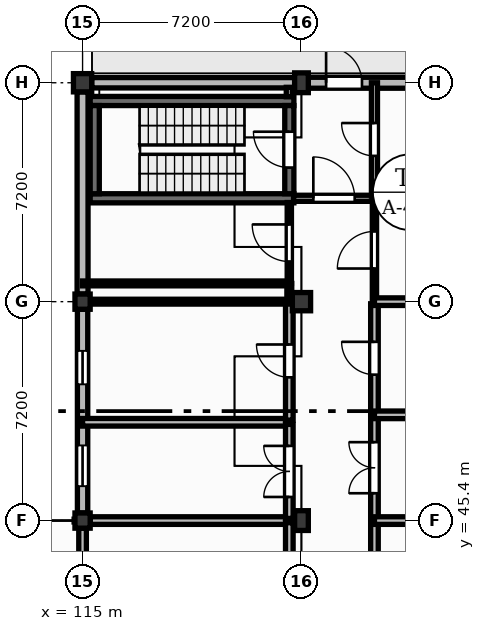
"""IFC4 building model, lengths in metres.
Left out: names, types, materials, properties, quantities, classifications, styles, units other than length and angle.
Written with IfcOpenShell. Run it as: python <this file> out.ifc"""

import sys

from ifc_helpers import new_model, si_unit, direction, frame, frame_2d, origin, origin_2d, place, context, subcontext, project, spatial, rectangle, extrude, element, fill, save


model = new_model("IFC4")
c1 = context("Model", 3, precision=1e-05, world=origin(), true_north=direction((0.0, 1.0)))
c2 = subcontext(c1, "Body", "Model", "MODEL_VIEW")
j1 = project(units=[si_unit("LENGTHUNIT", "METRE"), si_unit("PLANEANGLEUNIT", "RADIAN")], contexts=[c1])
p1 = place(None, origin())
s1 = spatial("IfcSite", under=j1, at=p1, CompositionType="ELEMENT")
p2 = place(p1, origin())
s2 = spatial("IfcBuilding", under=s1, at=p2, CompositionType="ELEMENT")
p3 = place(p2, origin())
s3 = spatial("IfcBuildingStorey", under=s2, at=p3, CompositionType="ELEMENT", Elevation=0.0)
for number, where, z_axis, x_axis in (
    (1, (115.0, 45.4, 0.0), (0.0, 0.0, 1.0), (1.0, 0.0, 0.0)),
    (2, (115.0, 52.6, 0.0), (0.0, 0.0, 1.0), (1.0, 0.0, 0.0)),
):
    element("IfcColumn", number, at=place(p3, frame(where, z_axis=z_axis, x_axis=x_axis)), inside=s3, PredefinedType="COLUMN", context=c2, shape_type="SweptSolid", body=[
        extrude(rectangle(XDim=0.5, YDim=0.5, at=origin_2d()), origin(), (0.0, 0.0, 1.0), 4.2),
    ])
p4 = place(p3, frame((115.0, 59.8, 0.0), z_axis=(0.0, 0.0, 1.0), x_axis=(1.0, 0.0, 0.0)))
e3 = element("IfcColumn", 3, at=p4, inside=s3, PredefinedType="COLUMN", context=c2, shape_type="SweptSolid", body=[
    extrude(rectangle(XDim=0.6, YDim=0.6, at=origin_2d()), origin(), (0.0, 0.0, 1.0), 4.2),
])
p5 = place(p3, frame((122.2, 45.4, 0.0), z_axis=(0.0, 0.0, 1.0), x_axis=(1.0, 0.0, 0.0)))
e4 = element("IfcColumn", 4, at=p5, inside=s3, PredefinedType="COLUMN", context=c2, shape_type="SweptSolid", body=[
    extrude(rectangle(XDim=0.45, YDim=0.65, at=origin_2d()), origin(), (0.0, 0.0, 1.0), 4.2),
])
p6 = place(p3, frame((122.2, 52.6, 0.0), z_axis=(0.0, 0.0, 1.0), x_axis=(1.0, 0.0, 0.0)))
e5 = element("IfcColumn", 5, at=p6, inside=s3, PredefinedType="COLUMN", context=c2, shape_type="SweptSolid", body=[
    extrude(rectangle(XDim=0.6, YDim=0.6, at=origin_2d()), origin(), (0.0, 0.0, 1.0), 4.2),
])
p7 = place(p3, frame((122.2, 59.8, 0.0), z_axis=(0.0, 0.0, 1.0), x_axis=(1.0, 0.0, 0.0)))
e6 = element("IfcColumn", 6, at=p7, inside=s3, PredefinedType="COLUMN", context=c2, shape_type="SweptSolid", body=[
    extrude(rectangle(XDim=0.45, YDim=0.65, at=origin_2d()), origin(), (0.0, 0.0, 1.0), 4.2),
])
p8 = place(p3, frame((115.0, 45.65, 0.0), z_axis=(0.0, 0.0, 1.0), x_axis=(0.0, 1.0, 0.0)))
e7 = element("IfcWall", 7, at=p8, inside=s3, PredefinedType="SOLIDWALL", context=c2, shape_type="SweptSolid", body=[
    extrude(rectangle(XDim=6.7, YDim=0.34, at=frame_2d((3.35, 0.0))), origin(), (0.0, 0.0, 1.0), 3.68),
])
p9 = place(p8, frame((0.881, 0.0, 1.0)))
e8 = element("IfcOpeningElement", 8, at=p9, cuts=e7, PredefinedType="OPENING", context=c2, shape_type="SweptSolid", body=[
    extrude(rectangle(XDim=1.34, YDim=1.95, at=frame_2d((0.67, 0.975))), frame((0.0, 0.18, 0.0), z_axis=(0.0, -1.0, 0.0), x_axis=(1.0, 0.0, 0.0)), (0.0, 0.0, 1.0), 0.36),
])
p10 = place(p8, frame((4.231, 0.0, 1.0)))
e9 = element("IfcOpeningElement", 9, at=p10, cuts=e7, PredefinedType="OPENING", context=c2, shape_type="SweptSolid", body=[
    extrude(rectangle(XDim=1.1, YDim=2.2, at=frame_2d((0.55, 1.1))), frame((0.0, 0.18, 0.0), z_axis=(0.0, -1.0, 0.0), x_axis=(1.0, 0.0, 0.0)), (0.0, 0.0, 1.0), 0.36),
])
p11 = place(p3, frame((115.3, 59.8, 0.0), z_axis=(0.0, 0.0, 1.0), x_axis=(1.0, 0.0, 0.0)))
e10 = element("IfcWall", 10, at=p11, inside=s3, PredefinedType="SOLIDWALL", context=c2, shape_type="SweptSolid", body=[
    extrude(rectangle(XDim=6.675, YDim=0.34, at=frame_2d((3.337, 0.0))), origin(), (0.0, 0.0, 1.0), 3.68),
])
p12 = place(p3, frame((115.0, 52.85, 0.0), z_axis=(0.0, 0.0, 1.0), x_axis=(0.0, 1.0, 0.0)))
e11 = element("IfcWall", 11, at=p12, inside=s3, PredefinedType="SOLIDWALL", context=c2, shape_type="SweptSolid", body=[
    extrude(rectangle(XDim=6.65, YDim=0.36, at=frame_2d((3.325, 0.0))), origin(), (0.0, 0.0, 1.0), 3.68),
])
p13 = place(p3, frame((122.425, 59.8, 0.0), z_axis=(0.0, 0.0, 1.0), x_axis=(1.0, 0.0, 0.0)))
e12 = element("IfcWall", 12, at=p13, inside=s3, PredefinedType="SOLIDWALL", context=c2, shape_type="SweptSolid", body=[
    extrude(rectangle(XDim=5.925, YDim=0.36, at=frame_2d((2.962, 0.0))), origin(), (0.0, 0.0, 1.0), 3.68),
])
p14 = place(p13, frame((0.585, 0.0, 0.0)))
e13 = element("IfcOpeningElement", 13, at=p14, cuts=e12, PredefinedType="OPENING", context=c2, shape_type="SweptSolid", body=[
    extrude(rectangle(XDim=1.18, YDim=2.2, at=frame_2d((0.59, 1.1))), frame((0.0, 0.19, 0.0), z_axis=(0.0, -1.0, 0.0), x_axis=(1.0, 0.0, 0.0)), (0.0, 0.0, 1.0), 0.38),
])
p15 = place(p13, frame((3.315, 0.0, 1.0)))
e14 = element("IfcOpeningElement", 14, at=p15, cuts=e12, PredefinedType="OPENING", context=c2, shape_type="SweptSolid", body=[
    extrude(rectangle(XDim=1.35, YDim=2.2, at=frame_2d((0.675, 1.1))), frame((0.0, 0.19, 0.0), z_axis=(0.0, -1.0, 0.0), x_axis=(1.0, 0.0, 0.0)), (0.0, 0.0, 1.0), 0.38),
])
for number, where, z_axis, x_axis in (
    (15, (115.25, 56.0, 0.0), (0.0, 0.0, 1.0), (1.0, 0.0, 0.0)),
    (16, (115.25, 59.2, 0.0), (0.0, 0.0, 1.0), (1.0, 0.0, 0.0)),
):
    element("IfcWall", number, at=place(p3, frame(where, z_axis=z_axis, x_axis=x_axis)), inside=s3, PredefinedType="SHEAR", context=c2, shape_type="SweptSolid", body=[
        extrude(rectangle(XDim=6.7, YDim=0.3, at=frame_2d((3.35, 0.0))), origin(), (0.0, 0.0, 1.0), 4.25),
    ])
p16 = place(p3, frame((115.4, 56.15, 0.0), z_axis=(0.0, 0.0, 1.0), x_axis=(0.0, 1.0, 0.0)))
e17 = element("IfcWall", 17, at=p16, inside=s3, PredefinedType="SHEAR", context=c2, shape_type="SweptSolid", body=[
    extrude(rectangle(XDim=2.9, YDim=0.3, at=frame_2d((1.45, 0.0))), origin(), (0.0, 0.0, 1.0), 4.25),
])
p17 = place(p3, frame((121.8, 56.15, 0.0), z_axis=(0.0, 0.0, 1.0), x_axis=(0.0, 1.0, 0.0)))
e18 = element("IfcWall", 18, at=p17, inside=s3, PredefinedType="SHEAR", context=c2, shape_type="SweptSolid", body=[
    extrude(rectangle(XDim=2.9, YDim=0.3, at=frame_2d((1.45, 0.0))), origin(), (0.0, 0.0, 1.0), 4.25),
])
p18 = place(p17, frame((0.86, 0.0, 0.0)))
e19 = element("IfcOpeningElement", 19, at=p18, cuts=e18, PredefinedType="OPENING", context=c2, shape_type="SweptSolid", body=[
    extrude(rectangle(XDim=1.18, YDim=2.15, at=frame_2d((0.59, 1.075))), frame((0.0, 0.16, 0.0), z_axis=(0.0, -1.0, 0.0), x_axis=(1.0, 0.0, 0.0)), (0.0, 0.0, 1.0), 0.32),
])
p19 = place(p3, frame((115.0, 40.663, 0.0), z_axis=(0.0, 0.0, 1.0), x_axis=(0.0, 1.0, 0.0)))
e20 = element("IfcWall", 20, at=p19, inside=s3, PredefinedType="SOLIDWALL", context=c2, shape_type="SweptSolid", body=[
    extrude(rectangle(XDim=4.487, YDim=0.25, at=frame_2d((2.243, 0.0))), origin(), (0.0, 0.0, 1.0), 3.4),
])
p20 = place(p3, frame((115.25, 45.4, 0.0), z_axis=(0.0, 0.0, 1.0), x_axis=(1.0, 0.0, 0.0)))
e21 = element("IfcWall", 21, at=p20, inside=s3, PredefinedType="SOLIDWALL", context=c2, shape_type="SweptSolid", body=[
    extrude(rectangle(XDim=6.55, YDim=0.25, at=frame_2d((3.275, 0.0))), origin(), (0.0, 0.0, 1.0), 3.25),
])
p21 = place(p3, frame((115.0, 48.633, 0.0), z_axis=(0.0, 0.0, 1.0), x_axis=(1.0, 0.0, 0.0)))
e22 = element("IfcWall", 22, at=p21, inside=s3, PredefinedType="SOLIDWALL", context=c2, shape_type="SweptSolid", body=[
    extrude(rectangle(XDim=6.8, YDim=0.25, at=frame_2d((3.4, 0.0))), origin(), (0.0, 0.0, 1.0), 4.18),
])
p22 = place(p3, frame((121.8, 40.663, 0.0), z_axis=(0.0, 0.0, 1.0), x_axis=(0.0, 1.0, 0.0)))
e23 = element("IfcWall", 23, at=p22, inside=s3, PredefinedType="SOLIDWALL", context=c2, shape_type="SweptSolid", body=[
    extrude(rectangle(XDim=4.667, YDim=0.25, at=frame_2d((2.333, 0.0))), origin(), (0.0, 0.0, 1.0), 4.18),
])
p23 = place(p22, frame((1.793, 0.0, 0.0)))
e24 = element("IfcOpeningElement", 24, at=p23, cuts=e23, PredefinedType="OPENING", context=c2, shape_type="SweptSolid", body=[
    extrude(rectangle(XDim=1.08, YDim=2.15, at=frame_2d((0.54, 1.075))), frame((0.0, 0.135, 0.0), z_axis=(0.0, -1.0, 0.0), x_axis=(1.0, 0.0, 0.0)), (0.0, 0.0, 1.0), 0.27),
])
p24 = place(p3, frame((121.8, 45.47, 0.0), z_axis=(0.0, 0.0, 1.0), x_axis=(0.0, 1.0, 0.0)))
e25 = element("IfcWall", 25, at=p24, inside=s3, PredefinedType="SOLIDWALL", context=c2, shape_type="SweptSolid", body=[
    extrude(rectangle(XDim=3.093, YDim=0.25, at=frame_2d((1.546, 0.0))), origin(), (0.0, 0.0, 1.0), 4.18),
])
p25 = place(p24, frame((0.707, 0.0, 0.0)))
e26 = element("IfcOpeningElement", 26, at=p25, cuts=e25, PredefinedType="OPENING", context=c2, shape_type="SweptSolid", body=[
    extrude(rectangle(XDim=1.68, YDim=2.3, at=frame_2d((0.84, 1.15))), frame((0.0, 0.135, 0.0), z_axis=(0.0, -1.0, 0.0), x_axis=(1.0, 0.0, 0.0)), (0.0, 0.0, 1.0), 0.27),
])
p26 = place(p3, frame((121.8, 48.703, 0.0), z_axis=(0.0, 0.0, 1.0), x_axis=(0.0, 1.0, 0.0)))
e27 = element("IfcWall", 27, at=p26, inside=s3, PredefinedType="SOLIDWALL", context=c2, shape_type="SweptSolid", body=[
    extrude(rectangle(XDim=3.897, YDim=0.25, at=frame_2d((1.949, 0.0))), origin(), (0.0, 0.0, 1.0), 4.18),
])
p27 = place(p26, frame((1.408, 0.0, 0.0)))
e28 = element("IfcOpeningElement", 28, at=p27, cuts=e27, PredefinedType="OPENING", context=c2, shape_type="SweptSolid", body=[
    extrude(rectangle(XDim=1.08, YDim=2.15, at=frame_2d((0.54, 1.075))), frame((0.0, 0.135, 0.0), z_axis=(0.0, -1.0, 0.0), x_axis=(1.0, 0.0, 0.0)), (0.0, 0.0, 1.0), 0.27),
])
p28 = place(p3, frame((121.8, 53.2, 0.0), z_axis=(0.0, 0.0, 1.0), x_axis=(0.0, 1.0, 0.0)))
e29 = element("IfcWall", 29, at=p28, inside=s3, PredefinedType="PARTITIONING", context=c2, shape_type="SweptSolid", body=[
    extrude(rectangle(XDim=2.66, YDim=0.14, at=frame_2d((1.33, 0.0))), origin(), (0.0, 0.0, 1.0), 4.18),
])
p29 = place(p28, frame((0.72, 0.0, 0.0)))
e30 = element("IfcOpeningElement", 30, at=p29, cuts=e29, PredefinedType="OPENING", context=c2, shape_type="SweptSolid", body=[
    extrude(rectangle(XDim=1.22, YDim=2.1, at=frame_2d((0.61, 1.05))), frame((0.0, 0.08, 0.0), z_axis=(0.0, -1.0, 0.0), x_axis=(1.0, 0.0, 0.0)), (0.0, 0.0, 1.0), 0.16),
])
p30 = place(p3, frame((121.94, 56.0, 0.0), z_axis=(0.0, 0.0, 1.0), x_axis=(1.0, 0.0, 0.0)))
e31 = element("IfcWall", 31, at=p30, inside=s3, PredefinedType="PARTITIONING", context=c2, shape_type="SweptSolid", body=[
    extrude(rectangle(XDim=2.66, YDim=0.2, at=frame_2d((1.33, 0.0))), origin(), (0.0, 0.0, 1.0), 4.18),
])
p31 = place(p30, frame((0.65, 0.0, 0.0)))
e32 = element("IfcOpeningElement", 32, at=p31, cuts=e31, PredefinedType="OPENING", context=c2, shape_type="SweptSolid", body=[
    extrude(rectangle(XDim=1.36, YDim=2.2, at=frame_2d((0.68, 1.1))), frame((0.0, 0.11, 0.0), z_axis=(0.0, -1.0, 0.0), x_axis=(1.0, 0.0, 0.0)), (0.0, 0.0, 1.0), 0.22),
])
p32 = place(p3, frame((124.6, 41.97, 0.0), z_axis=(0.0, 0.0, 1.0), x_axis=(0.0, 1.0, 0.0)))
e33 = element("IfcWall", 33, at=p32, inside=s3, PredefinedType="SOLIDWALL", context=c2, shape_type="SweptSolid", body=[
    extrude(rectangle(XDim=3.36, YDim=0.25, at=frame_2d((1.68, 0.0))), origin(), (0.0, 0.0, 1.0), 4.18),
])
p33 = place(p32, frame((1.14, 0.0, 0.0)))
e34 = element("IfcOpeningElement", 34, at=p33, cuts=e33, PredefinedType="OPENING", context=c2, shape_type="SweptSolid", body=[
    extrude(rectangle(XDim=1.08, YDim=2.15, at=frame_2d((0.54, 1.075))), frame((0.0, 0.135, 0.0), z_axis=(0.0, -1.0, 0.0), x_axis=(1.0, 0.0, 0.0)), (0.0, 0.0, 1.0), 0.27),
])
p34 = place(p3, frame((124.6, 45.47, 0.0), z_axis=(0.0, 0.0, 1.0), x_axis=(0.0, 1.0, 0.0)))
e35 = element("IfcWall", 35, at=p34, inside=s3, PredefinedType="SOLIDWALL", context=c2, shape_type="SweptSolid", body=[
    extrude(rectangle(XDim=3.338, YDim=0.25, at=frame_2d((1.669, 0.0))), origin(), (0.0, 0.0, 1.0), 4.18),
])
p35 = place(p34, frame((0.829, 0.0, 0.0)))
e36 = element("IfcOpeningElement", 36, at=p35, cuts=e35, PredefinedType="OPENING", context=c2, shape_type="SweptSolid", body=[
    extrude(rectangle(XDim=1.68, YDim=2.3, at=frame_2d((0.84, 1.15))), frame((0.0, 0.135, 0.0), z_axis=(0.0, -1.0, 0.0), x_axis=(1.0, 0.0, 0.0)), (0.0, 0.0, 1.0), 0.27),
])
p36 = place(p3, frame((124.6, 45.4, 0.0), z_axis=(0.0, 0.0, 1.0), x_axis=(1.0, 0.0, 0.0)))
e37 = element("IfcWall", 37, at=p36, inside=s3, PredefinedType="SOLIDWALL", context=c2, shape_type="SweptSolid", body=[
    extrude(rectangle(XDim=3.7, YDim=0.25, at=frame_2d((1.85, 0.0))), origin(), (0.0, 0.0, 1.0), 3.25),
])
p37 = place(p3, frame((124.6, 48.948, 0.0), z_axis=(0.0, 0.0, 1.0), x_axis=(0.0, 1.0, 0.0)))
e38 = element("IfcWall", 38, at=p37, inside=s3, PredefinedType="SOLIDWALL", context=c2, shape_type="SweptSolid", body=[
    extrude(rectangle(XDim=3.582, YDim=0.25, at=frame_2d((1.791, 0.0))), origin(), (0.0, 0.0, 1.0), 4.18),
])
p38 = place(p37, frame((1.251, 0.0, 0.0)))
e39 = element("IfcOpeningElement", 39, at=p38, cuts=e38, PredefinedType="OPENING", context=c2, shape_type="SweptSolid", body=[
    extrude(rectangle(XDim=1.08, YDim=2.15, at=frame_2d((0.54, 1.075))), frame((0.0, 0.135, 0.0), z_axis=(0.0, -1.0, 0.0), x_axis=(1.0, 0.0, 0.0)), (0.0, 0.0, 1.0), 0.27),
])
p39 = place(p3, frame((124.6, 48.878, 0.0), z_axis=(0.0, 0.0, 1.0), x_axis=(1.0, 0.0, 0.0)))
e40 = element("IfcWall", 40, at=p39, inside=s3, PredefinedType="SOLIDWALL", context=c2, shape_type="SweptSolid", body=[
    extrude(rectangle(XDim=4.795, YDim=0.25, at=frame_2d((2.397, 0.0))), origin(), (0.0, 0.0, 1.0), 4.18),
])
p40 = place(p3, frame((124.6, 52.67, 0.0), z_axis=(0.0, 0.0, 1.0), x_axis=(0.0, 1.0, 0.0)))
e41 = element("IfcWall", 41, at=p40, inside=s3, PredefinedType="PARTITIONING", context=c2, shape_type="SweptSolid", body=[
    extrude(rectangle(XDim=3.26, YDim=0.14, at=frame_2d((1.63, 0.0))), origin(), (0.0, 0.0, 1.0), 4.18),
])
p41 = place(p40, frame((1.02, 0.0, 0.0)))
e42 = element("IfcOpeningElement", 42, at=p41, cuts=e41, PredefinedType="OPENING", context=c2, shape_type="SweptSolid", body=[
    extrude(rectangle(XDim=1.22, YDim=2.1, at=frame_2d((0.61, 1.05))), frame((0.0, 0.08, 0.0), z_axis=(0.0, -1.0, 0.0), x_axis=(1.0, 0.0, 0.0)), (0.0, 0.0, 1.0), 0.16),
])
p42 = place(p3, frame((124.6, 52.6, 0.0), z_axis=(0.0, 0.0, 1.0), x_axis=(1.0, 0.0, 0.0)))
e43 = element("IfcWall", 43, at=p42, inside=s3, PredefinedType="SOLIDWALL", context=c2, shape_type="SweptSolid", body=[
    extrude(rectangle(XDim=3.75, YDim=0.25, at=frame_2d((1.875, 0.0))), origin(), (0.0, 0.0, 1.0), 3.5),
])
p43 = place(p3, frame((124.6, 56.07, 0.0), z_axis=(0.0, 0.0, 1.0), x_axis=(0.0, 1.0, 0.0)))
e44 = element("IfcWall", 44, at=p43, inside=s3, PredefinedType="PARTITIONING", context=c2, shape_type="SweptSolid", body=[
    extrude(rectangle(XDim=3.73, YDim=0.2, at=frame_2d((1.865, 0.0))), origin(), (0.0, 0.0, 1.0), 4.18),
])
p44 = place(p43, frame((1.325, 0.0, 0.0)))
e45 = element("IfcOpeningElement", 45, at=p44, cuts=e44, PredefinedType="OPENING", context=c2, shape_type="SweptSolid", body=[
    extrude(rectangle(XDim=1.08, YDim=2.15, at=frame_2d((0.54, 1.075))), frame((0.0, 0.11, 0.0), z_axis=(0.0, -1.0, 0.0), x_axis=(1.0, 0.0, 0.0)), (0.0, 0.0, 1.0), 0.22),
])
p45 = place(p3, frame((124.6, 56.0, 0.0), z_axis=(0.0, 0.0, 1.0), x_axis=(1.0, 0.0, 0.0)))
e46 = element("IfcWall", 46, at=p45, inside=s3, PredefinedType="SOLIDWALL", context=c2, shape_type="SweptSolid", body=[
    extrude(rectangle(XDim=4.795, YDim=0.25, at=frame_2d((2.397, 0.0))), origin(), (0.0, 0.0, 1.0), 4.18),
])
p46 = place(p3, frame((121.8, 59.34, 0.0), z_axis=(0.0, 0.0, 1.0), x_axis=(0.0, 1.0, 0.0)))
e47 = element("IfcWall", 47, at=p46, inside=s3, PredefinedType="PARTITIONING", context=c2, shape_type="SweptSolid", body=[
    extrude(rectangle(XDim=0.31, YDim=0.2, at=frame_2d((0.155, 0.0))), origin(), (0.0, 0.0, 1.0), 4.18),
])
p47 = place(p3, frame((121.8, 52.6, 0.0), z_axis=(0.0, 0.0, 1.0), x_axis=(0.0, 1.0, 0.0)))
e48 = element("IfcWall", 48, at=p47, inside=s3, PredefinedType="PARTITIONING", context=c2, shape_type="SweptSolid", body=[
    extrude(rectangle(XDim=0.6, YDim=0.16, at=frame_2d((0.3, 0.0))), origin(), (0.0, 0.0, 1.0), 4.18),
])
p48 = place(p3, frame((115.0, 53.2, 0.0), z_axis=(0.0, 0.0, 1.0), x_axis=(1.0, 0.0, 0.0)))
e49 = element("IfcWall", 49, at=p48, inside=s3, PredefinedType="PARTITIONING", context=c2, shape_type="SweptSolid", body=[
    extrude(rectangle(XDim=6.8, YDim=0.16, at=frame_2d((3.4, 0.0))), origin(), (0.0, 0.0, 1.0), 4.18),
])
p49 = place(p3, frame((121.8, 52.6, 0.0), z_axis=(0.0, 0.0, 1.0), x_axis=(-1.0, 0.0, 0.0)))
e50 = element("IfcWall", 50, at=p49, inside=s3, PredefinedType="PARTITIONING", context=c2, shape_type="SweptSolid", body=[
    extrude(rectangle(XDim=6.55, YDim=0.16, at=frame_2d((3.275, 0.0))), origin(), (0.0, 0.0, 1.0), 3.5),
])
p50 = place(p9, origin())
e51 = element("IfcWindow", 51, at=p50, inside=s3, PartitioningType="SINGLE_PANEL", PredefinedType="WINDOW", context=c2, shape_type="SweptSolid", body=[
    extrude(rectangle(XDim=1.34, YDim=1.95, at=frame_2d((0.67, 0.975))), frame((0.0, 0.03, 0.0), z_axis=(0.0, -1.0, 0.0), x_axis=(1.0, 0.0, 0.0)), (0.0, 0.0, 1.0), 0.06),
])
fill(e8, e51)
p51 = place(p10, origin())
e52 = element("IfcWindow", 52, at=p51, inside=s3, PartitioningType="SINGLE_PANEL", PredefinedType="WINDOW", context=c2, shape_type="SweptSolid", body=[
    extrude(rectangle(XDim=1.1, YDim=2.2, at=frame_2d((0.55, 1.1))), frame((0.0, 0.03, 0.0), z_axis=(0.0, -1.0, 0.0), x_axis=(1.0, 0.0, 0.0)), (0.0, 0.0, 1.0), 0.06),
])
fill(e9, e52)
p52 = place(p14, origin())
e53 = element("IfcDoor", 53, at=p52, inside=s3, OperationType="SINGLE_SWING_LEFT", PredefinedType="DOOR", context=c2, shape_type="SweptSolid", body=[
    extrude(rectangle(XDim=1.18, YDim=2.2, at=frame_2d((0.59, 1.1))), frame((0.0, 0.025, 0.0), z_axis=(0.0, -1.0, 0.0), x_axis=(1.0, 0.0, 0.0)), (0.0, 0.0, 1.0), 0.05),
])
fill(e13, e53)
p53 = place(p18, origin())
e54 = element("IfcDoor", 54, at=p53, inside=s3, OperationType="SINGLE_SWING_RIGHT", PredefinedType="DOOR", context=c2, shape_type="SweptSolid", body=[
    extrude(rectangle(XDim=1.18, YDim=2.15, at=frame_2d((0.59, 1.075))), frame((0.0, 0.025, 0.0), z_axis=(0.0, -1.0, 0.0), x_axis=(1.0, 0.0, 0.0)), (0.0, 0.0, 1.0), 0.05),
])
fill(e19, e54)
p54 = place(p29, origin())
e55 = element("IfcDoor", 55, at=p54, inside=s3, OperationType="SINGLE_SWING_RIGHT", PredefinedType="DOOR", context=c2, shape_type="SweptSolid", body=[
    extrude(rectangle(XDim=1.22, YDim=2.1, at=frame_2d((0.61, 1.05))), frame((0.0, 0.025, 0.0), z_axis=(0.0, -1.0, 0.0), x_axis=(1.0, 0.0, 0.0)), (0.0, 0.0, 1.0), 0.05),
])
fill(e30, e55)
p55 = place(p31, origin())
e56 = element("IfcDoor", 56, at=p55, inside=s3, OperationType="SINGLE_SWING_LEFT", PredefinedType="DOOR", context=c2, shape_type="SweptSolid", body=[
    extrude(rectangle(XDim=1.36, YDim=2.2, at=frame_2d((0.68, 1.1))), frame((0.0, 0.025, 0.0), z_axis=(0.0, -1.0, 0.0), x_axis=(1.0, 0.0, 0.0)), (0.0, 0.0, 1.0), 0.05),
])
fill(e32, e56)
p56 = place(p25, origin())
e57 = element("IfcDoor", 57, at=p56, inside=s3, OperationType="DOUBLE_DOOR_SINGLE_SWING", PredefinedType="DOOR", context=c2, shape_type="SweptSolid", body=[
    extrude(rectangle(XDim=1.68, YDim=2.3, at=frame_2d((0.84, 1.15))), frame((0.0, 0.025, 0.0), z_axis=(0.0, -1.0, 0.0), x_axis=(1.0, 0.0, 0.0)), (0.0, 0.0, 1.0), 0.05),
])
fill(e26, e57)
p57 = place(p27, origin())
e58 = element("IfcDoor", 58, at=p57, inside=s3, OperationType="SINGLE_SWING_RIGHT", PredefinedType="DOOR", context=c2, shape_type="SweptSolid", body=[
    extrude(rectangle(XDim=1.08, YDim=2.15, at=frame_2d((0.54, 1.075))), frame((0.0, 0.025, 0.0), z_axis=(0.0, -1.0, 0.0), x_axis=(1.0, 0.0, 0.0)), (0.0, 0.0, 1.0), 0.05),
])
fill(e28, e58)
p58 = place(p35, origin())
e59 = element("IfcDoor", 59, at=p58, inside=s3, OperationType="DOUBLE_DOOR_SINGLE_SWING", PredefinedType="DOOR", context=c2, shape_type="SweptSolid", body=[
    extrude(rectangle(XDim=1.68, YDim=2.3, at=frame_2d((0.84, 1.15))), frame((0.0, 0.025, 0.0), z_axis=(0.0, -1.0, 0.0), x_axis=(1.0, 0.0, 0.0)), (0.0, 0.0, 1.0), 0.05),
])
fill(e36, e59)
p59 = place(p38, origin())
e60 = element("IfcDoor", 60, at=p59, inside=s3, OperationType="SINGLE_SWING_RIGHT", PredefinedType="DOOR", context=c2, shape_type="SweptSolid", body=[
    extrude(rectangle(XDim=1.08, YDim=2.15, at=frame_2d((0.54, 1.075))), frame((0.0, 0.025, 0.0), z_axis=(0.0, -1.0, 0.0), x_axis=(1.0, 0.0, 0.0)), (0.0, 0.0, 1.0), 0.05),
])
fill(e39, e60)
p60 = place(p41, origin())
e61 = element("IfcDoor", 61, at=p60, inside=s3, OperationType="SINGLE_SWING_LEFT", PredefinedType="DOOR", context=c2, shape_type="SweptSolid", body=[
    extrude(rectangle(XDim=1.22, YDim=2.1, at=frame_2d((0.61, 1.05))), frame((0.0, 0.025, 0.0), z_axis=(0.0, -1.0, 0.0), x_axis=(1.0, 0.0, 0.0)), (0.0, 0.0, 1.0), 0.05),
])
fill(e42, e61)
p61 = place(p44, origin())
e62 = element("IfcDoor", 62, at=p61, inside=s3, OperationType="SINGLE_SWING_RIGHT", PredefinedType="DOOR", context=c2, shape_type="SweptSolid", body=[
    extrude(rectangle(XDim=1.08, YDim=2.15, at=frame_2d((0.54, 1.075))), frame((0.0, 0.025, 0.0), z_axis=(0.0, -1.0, 0.0), x_axis=(1.0, 0.0, 0.0)), (0.0, 0.0, 1.0), 0.05),
])
fill(e45, e62)
save(model, sys.argv[1])
